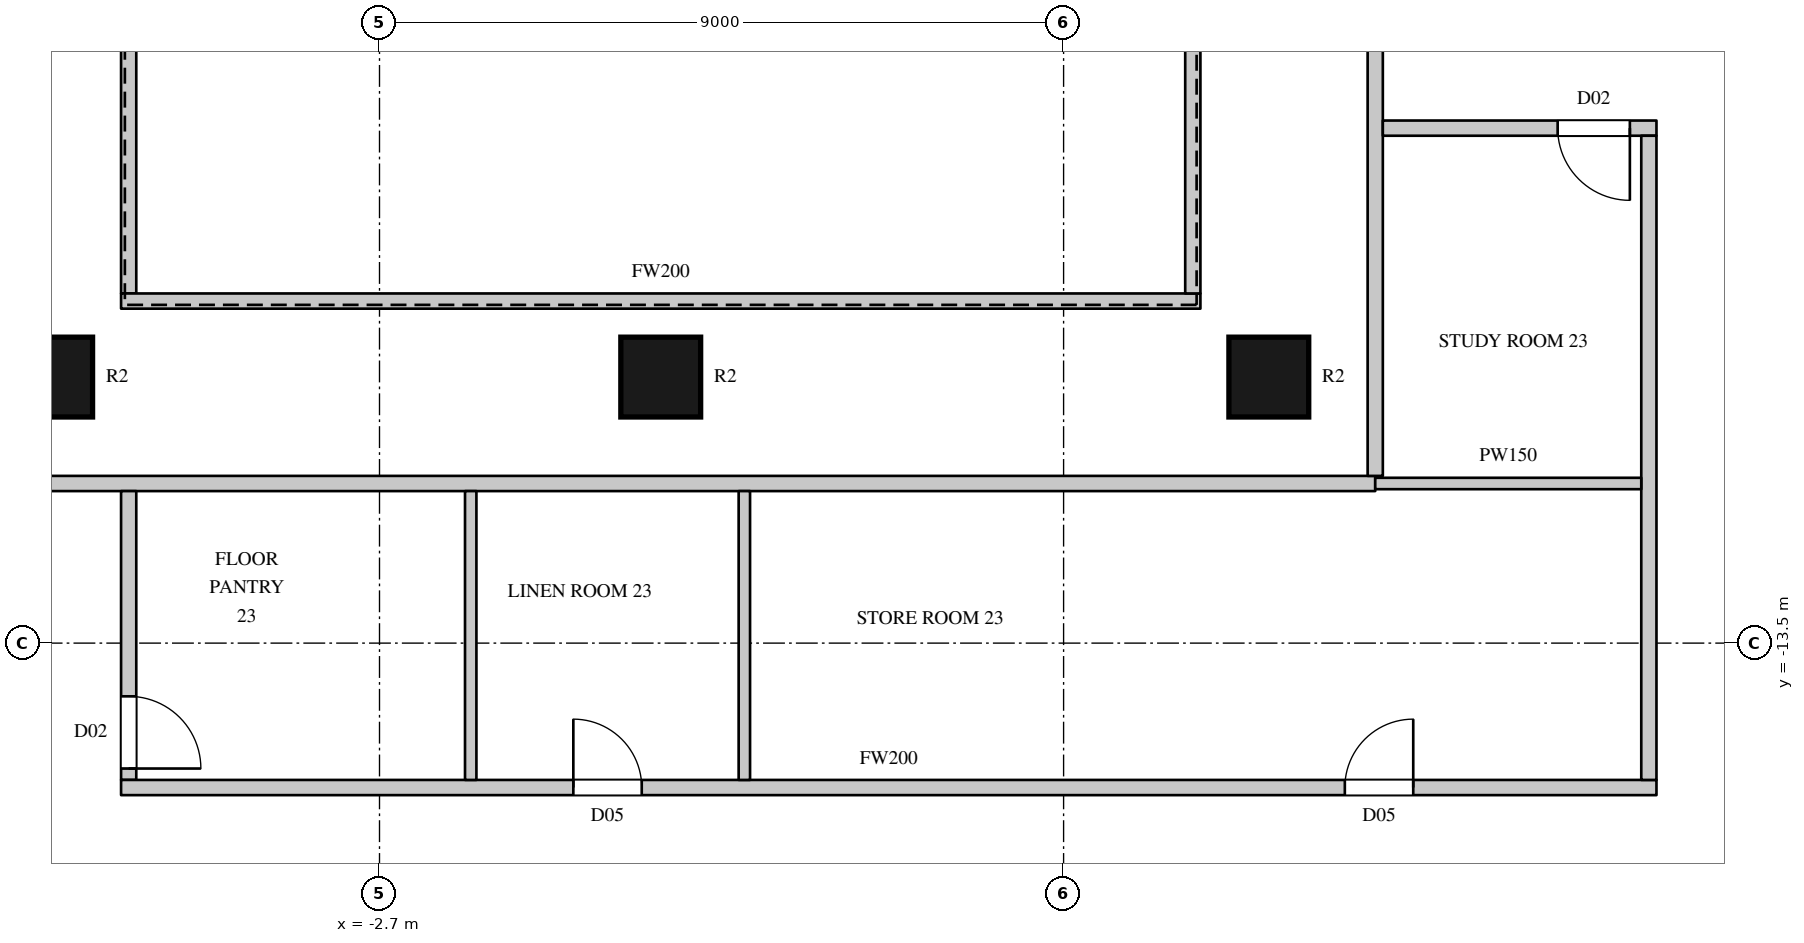
"""IFC4 building model, lengths in metres.
Left out: names, types, materials, properties, quantities, classifications, styles, units other than length and angle.
Written with IfcOpenShell. Run it as: python <this file> out.ifc"""

import sys

from ifc_helpers import new_model, si_unit, direction, frame, frame_2d, origin, origin_2d, place, context, subcontext, project, spatial, rectangle, circle, extrude, element, fill, save


model = new_model("IFC4")
c1 = context("Model", 3, precision=1e-05, world=origin(), true_north=direction((0.0, 1.0)))
c2 = subcontext(c1, "Body", "Model", "MODEL_VIEW")
j1 = project(units=[si_unit("LENGTHUNIT", "METRE"), si_unit("PLANEANGLEUNIT", "RADIAN")], contexts=[c1])
p1 = place(None, origin())
s1 = spatial("IfcSite", under=j1, at=p1, CompositionType="ELEMENT")
p2 = place(p1, origin())
s2 = spatial("IfcBuilding", under=s1, at=p2, CompositionType="ELEMENT")
p3 = place(p2, frame((0.0, 0.0, 113.1)))
s3 = spatial("IfcBuildingStorey", under=s2, at=p3, CompositionType="ELEMENT", Elevation=113.1)
for number, where, z_axis, x_axis in (
    (1, (-7.0, -10.0, 0.0), (0.0, 0.0, 1.0), (1.0, 0.0, 0.0)),
    (2, (1.0, -10.0, 0.0), (0.0, 0.0, 1.0), (1.0, 0.0, 0.0)),
    (3, (9.0, -10.0, 0.0), (0.0, 0.0, 1.0), (1.0, 0.0, 0.0)),
):
    element("IfcColumn", number, at=place(p3, frame(where, z_axis=z_axis, x_axis=x_axis)), inside=s3, PredefinedType="COLUMN", context=c2, shape_type="SweptSolid", body=[
        extrude(circle(Radius=0.525, at=origin_2d()), origin(), (0.0, 0.0, 1.0), 3.6),
    ])
p4 = place(p3, frame((-8.5, -11.4, 0.0), z_axis=(0.0, 0.0, 1.0), x_axis=(1.0, 0.0, 0.0)))
e4 = element("IfcWall", 4, at=p4, inside=s3, PredefinedType="PARTITIONING", context=c2, shape_type="SweptSolid", body=[
    extrude(rectangle(XDim=18.9, YDim=0.2, at=frame_2d((9.45, 0.0))), origin(), (0.0, 0.0, 1.0), 3.3),
])
p5 = place(p3, frame((-6.0, -15.3, 0.0), z_axis=(0.0, 0.0, 1.0), x_axis=(0.0, 1.0, 0.0)))
e5 = element("IfcWall", 5, at=p5, inside=s3, PredefinedType="PARTITIONING", context=c2, shape_type="SweptSolid", body=[
    extrude(rectangle(XDim=3.8, YDim=0.2, at=frame_2d((1.9, 0.0))), origin(), (0.0, 0.0, 1.0), 3.3),
])
p6 = place(p5, frame((0.15, 0.0, 0.0)))
e6 = element("IfcOpeningElement", 6, at=p6, cuts=e5, PredefinedType="OPENING", context=c2, shape_type="SweptSolid", body=[
    extrude(rectangle(XDim=0.95, YDim=2.2, at=frame_2d((0.475, 1.1))), frame((0.0, 0.11, 0.0), z_axis=(0.0, -1.0, 0.0), x_axis=(1.0, 0.0, 0.0)), (0.0, 0.0, 1.0), 0.22),
])
p7 = place(p3, frame((-6.1, -15.4, 0.0), z_axis=(0.0, 0.0, 1.0), x_axis=(1.0, 0.0, 0.0)))
e7 = element("IfcWall", 7, at=p7, inside=s3, PredefinedType="PARTITIONING", context=c2, shape_type="SweptSolid", body=[
    extrude(rectangle(XDim=20.2, YDim=0.2, at=frame_2d((10.1, 0.0))), origin(), (0.0, 0.0, 1.0), 3.3),
])
p8 = place(p7, frame((5.95, 0.0, 0.0)))
e8 = element("IfcOpeningElement", 8, at=p8, cuts=e7, PredefinedType="OPENING", context=c2, shape_type="SweptSolid", body=[
    extrude(rectangle(XDim=0.9, YDim=2.2, at=frame_2d((0.45, 1.1))), frame((0.0, 0.11, 0.0), z_axis=(0.0, -1.0, 0.0), x_axis=(1.0, 0.0, 0.0)), (0.0, 0.0, 1.0), 0.22),
])
p9 = place(p7, frame((16.1, 0.0, 0.0)))
e9 = element("IfcOpeningElement", 9, at=p9, cuts=e7, PredefinedType="OPENING", context=c2, shape_type="SweptSolid", body=[
    extrude(rectangle(XDim=0.9, YDim=2.2, at=frame_2d((0.45, 1.1))), frame((0.0, 0.11, 0.0), z_axis=(0.0, -1.0, 0.0), x_axis=(1.0, 0.0, 0.0)), (0.0, 0.0, 1.0), 0.22),
])
p10 = place(p3, frame((-6.0, -8.9, 0.0), z_axis=(0.0, 0.0, 1.0), x_axis=(0.0, 1.0, 0.0)))
e10 = element("IfcWall", 10, at=p10, inside=s3, PredefinedType="PARTITIONING", context=c2, shape_type="SweptSolid", body=[
    extrude(rectangle(XDim=17.8, YDim=0.2, at=frame_2d((8.9, 0.0))), origin(), (0.0, 0.0, 1.0), 3.3),
])
p11 = place(p3, frame((-6.1, -9.0, 0.0), z_axis=(0.0, 0.0, 1.0), x_axis=(1.0, 0.0, 0.0)))
e11 = element("IfcWall", 11, at=p11, inside=s3, PredefinedType="PARTITIONING", context=c2, shape_type="SweptSolid", body=[
    extrude(rectangle(XDim=14.2, YDim=0.2, at=frame_2d((7.1, 0.0))), origin(), (0.0, 0.0, 1.0), 3.3),
])
p12 = place(p3, frame((8.0, -8.9, 0.0), z_axis=(0.0, 0.0, 1.0), x_axis=(0.0, 1.0, 0.0)))
e12 = element("IfcWall", 12, at=p12, inside=s3, PredefinedType="PARTITIONING", context=c2, shape_type="SweptSolid", body=[
    extrude(rectangle(XDim=17.8, YDim=0.2, at=frame_2d((8.9, 0.0))), origin(), (0.0, 0.0, 1.0), 3.3),
])
p13 = place(p3, frame((10.4, -11.3, 0.0), z_axis=(0.0, 0.0, 1.0), x_axis=(0.0, 1.0, 0.0)))
e13 = element("IfcWall", 13, at=p13, inside=s3, PredefinedType="PARTITIONING", context=c2, shape_type="SweptSolid", body=[
    extrude(rectangle(XDim=22.6, YDim=0.2, at=frame_2d((11.3, 0.0))), origin(), (0.0, 0.0, 1.0), 3.3),
])
p14 = place(p13, frame((16.3, 0.0, 0.0)))
e14 = element("IfcOpeningElement", 14, at=p14, cuts=e13, PredefinedType="OPENING", context=c2, shape_type="SweptSolid", body=[
    extrude(rectangle(XDim=1.5, YDim=2.2, at=frame_2d((0.75, 1.1))), frame((0.0, 0.11, 0.0), z_axis=(0.0, -1.0, 0.0), x_axis=(1.0, 0.0, 0.0)), (0.0, 0.0, 1.0), 0.22),
])
p15 = place(p13, frame((14.65, 0.0, 0.0)))
e15 = element("IfcOpeningElement", 15, at=p15, cuts=e13, PredefinedType="OPENING", context=c2, shape_type="SweptSolid", body=[
    extrude(rectangle(XDim=1.5, YDim=2.2, at=frame_2d((0.75, 1.1))), frame((0.0, 0.11, 0.0), z_axis=(0.0, -1.0, 0.0), x_axis=(1.0, 0.0, 0.0)), (0.0, 0.0, 1.0), 0.22),
])
p16 = place(p13, frame((11.95, 0.0, 0.0)))
e16 = element("IfcOpeningElement", 16, at=p16, cuts=e13, PredefinedType="OPENING", context=c2, shape_type="SweptSolid", body=[
    extrude(rectangle(XDim=1.5, YDim=2.2, at=frame_2d((0.75, 1.1))), frame((0.0, 0.11, 0.0), z_axis=(0.0, -1.0, 0.0), x_axis=(1.0, 0.0, 0.0)), (0.0, 0.0, 1.0), 0.22),
])
p17 = place(p3, frame((10.5, -6.725, 0.0), z_axis=(0.0, 0.0, 1.0), x_axis=(1.0, 0.0, 0.0)))
e17 = element("IfcWall", 17, at=p17, inside=s3, PredefinedType="PARTITIONING", context=c2, shape_type="SweptSolid", body=[
    extrude(rectangle(XDim=3.6, YDim=0.2, at=frame_2d((1.8, 0.0))), origin(), (0.0, 0.0, 1.0), 3.3),
])
p18 = place(p17, frame((2.3, 0.0, 0.0)))
e18 = element("IfcOpeningElement", 18, at=p18, cuts=e17, PredefinedType="OPENING", context=c2, shape_type="SweptSolid", body=[
    extrude(rectangle(XDim=0.95, YDim=2.2, at=frame_2d((0.475, 1.1))), frame((0.0, 0.11, 0.0), z_axis=(0.0, -1.0, 0.0), x_axis=(1.0, 0.0, 0.0)), (0.0, 0.0, 1.0), 0.22),
])
p19 = place(p3, frame((14.0, -15.3, 0.0), z_axis=(0.0, 0.0, 1.0), x_axis=(0.0, 1.0, 0.0)))
e19 = element("IfcWall", 19, at=p19, inside=s3, PredefinedType="PARTITIONING", context=c2, shape_type="SweptSolid", body=[
    extrude(rectangle(XDim=8.475, YDim=0.2, at=frame_2d((4.238, 0.0))), origin(), (0.0, 0.0, 1.0), 3.3),
])
for number, where, z_axis, x_axis in (
    (20, (-1.5, -15.3, 0.0), (0.0, 0.0, 1.0), (0.0, 1.0, 0.0)),
    (21, (2.1, -15.3, 0.0), (0.0, 0.0, 1.0), (0.0, 1.0, 0.0)),
):
    element("IfcWall", number, at=place(p3, frame(where, z_axis=z_axis, x_axis=x_axis)), inside=s3, PredefinedType="PARTITIONING", context=c2, shape_type="SweptSolid", body=[
        extrude(rectangle(XDim=3.8, YDim=0.15, at=frame_2d((1.9, 0.0))), origin(), (0.0, 0.0, 1.0), 3.3),
    ])
p20 = place(p3, frame((10.4, -11.4, 0.0), z_axis=(0.0, 0.0, 1.0), x_axis=(1.0, 0.0, 0.0)))
e22 = element("IfcWall", 22, at=p20, inside=s3, PredefinedType="PARTITIONING", context=c2, shape_type="SweptSolid", body=[
    extrude(rectangle(XDim=3.5, YDim=0.15, at=frame_2d((1.75, 0.0))), origin(), (0.0, 0.0, 1.0), 3.3),
])
p21 = place(p6, origin())
e23 = element("IfcDoor", 23, at=p21, inside=s3, OperationType="SINGLE_SWING_RIGHT", PredefinedType="DOOR", context=c2, shape_type="SweptSolid", body=[
    extrude(rectangle(XDim=0.95, YDim=2.2, at=frame_2d((0.475, 1.1))), frame((0.0, 0.025, 0.0), z_axis=(0.0, -1.0, 0.0), x_axis=(1.0, 0.0, 0.0)), (0.0, 0.0, 1.0), 0.05),
])
fill(e6, e23)
p22 = place(p8, origin())
e24 = element("IfcDoor", 24, at=p22, inside=s3, OperationType="SINGLE_SWING_LEFT", PredefinedType="DOOR", context=c2, shape_type="SweptSolid", body=[
    extrude(rectangle(XDim=0.9, YDim=2.2, at=frame_2d((0.45, 1.1))), frame((0.0, 0.025, 0.0), z_axis=(0.0, -1.0, 0.0), x_axis=(1.0, 0.0, 0.0)), (0.0, 0.0, 1.0), 0.05),
])
fill(e8, e24)
p23 = place(p9, origin())
e25 = element("IfcDoor", 25, at=p23, inside=s3, OperationType="SINGLE_SWING_RIGHT", PredefinedType="DOOR", context=c2, shape_type="SweptSolid", body=[
    extrude(rectangle(XDim=0.9, YDim=2.2, at=frame_2d((0.45, 1.1))), frame((0.0, 0.025, 0.0), z_axis=(0.0, -1.0, 0.0), x_axis=(1.0, 0.0, 0.0)), (0.0, 0.0, 1.0), 0.05),
])
fill(e9, e25)
p24 = place(p18, origin())
e26 = element("IfcDoor", 26, at=p24, inside=s3, OperationType="SINGLE_SWING_LEFT", PredefinedType="DOOR", context=c2, shape_type="SweptSolid", body=[
    extrude(rectangle(XDim=0.95, YDim=2.2, at=frame_2d((0.475, 1.1))), frame((0.0, 0.025, 0.0), z_axis=(0.0, -1.0, 0.0), x_axis=(1.0, 0.0, 0.0)), (0.0, 0.0, 1.0), 0.05),
])
fill(e18, e26)
save(model, sys.argv[1])
